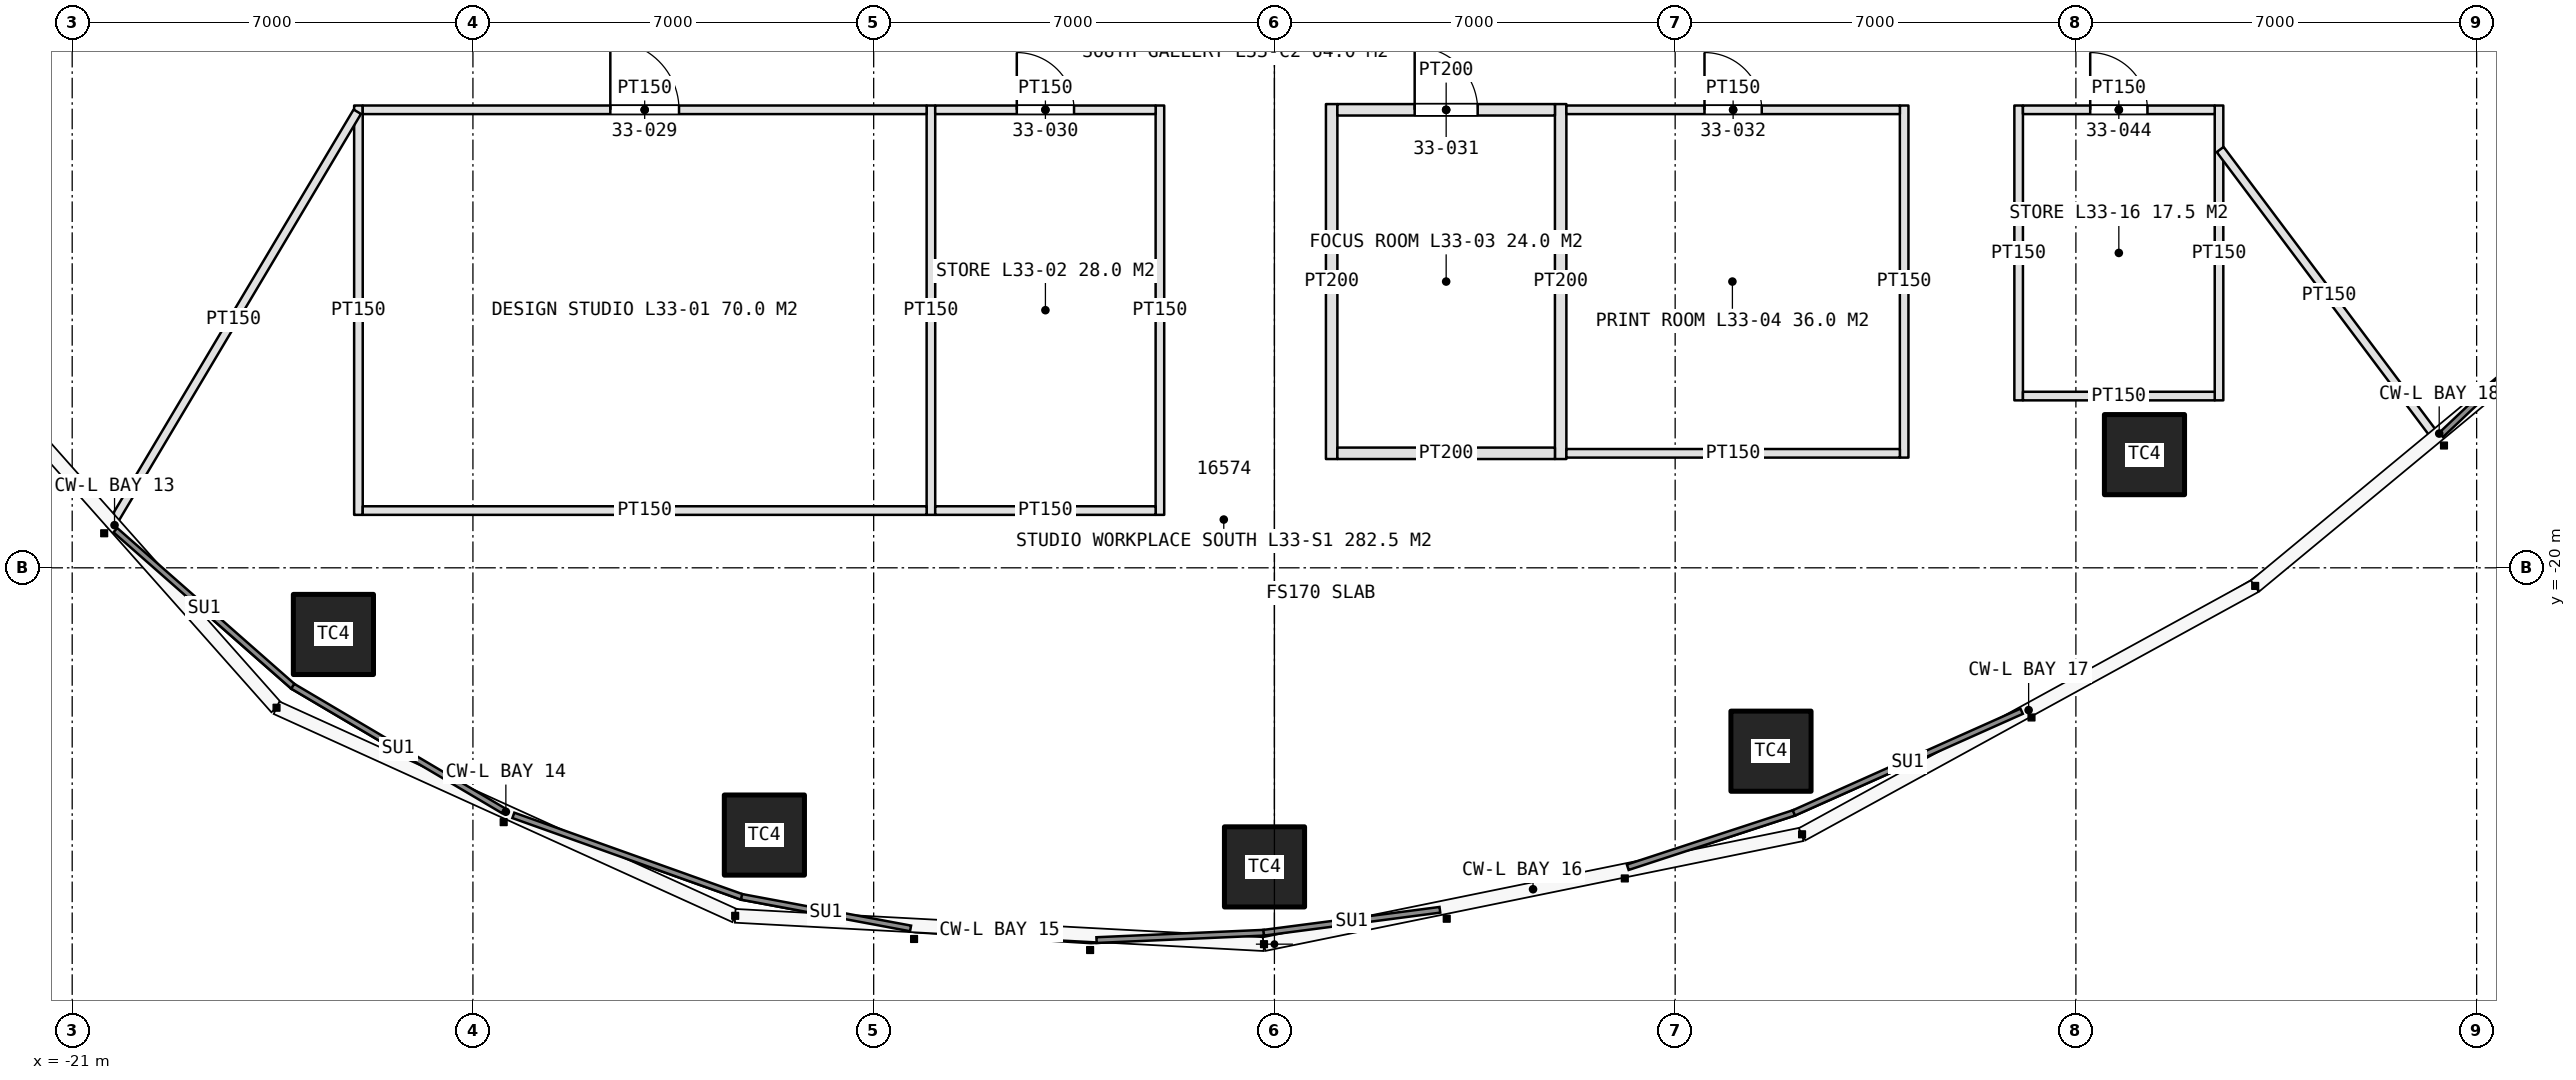
"""IFC4 building model, lengths in metres.
Left out: names, types, materials, properties, quantities, classifications, styles, units other than length and angle.
Written with IfcOpenShell. Run it as: python <this file> out.ifc"""

import sys

from ifc_helpers import new_model, si_unit, direction, frame, frame_2d, origin, origin_2d, place, context, subcontext, project, spatial, rectangle, extrude, element, fill, save


model = new_model("IFC4")
c1 = context("Model", 3, precision=1e-05, world=origin(), true_north=direction((0.0, 1.0)))
c2 = subcontext(c1, "Body", "Model", "MODEL_VIEW")
j1 = project(units=[si_unit("LENGTHUNIT", "METRE"), si_unit("PLANEANGLEUNIT", "RADIAN")], contexts=[c1])
p1 = place(None, origin())
s1 = spatial("IfcSite", under=j1, at=p1, CompositionType="ELEMENT")
p2 = place(p1, origin())
s2 = spatial("IfcBuilding", under=s1, at=p2, CompositionType="ELEMENT")
p3 = place(p2, frame((0.0, 0.0, 155.4)))
s3 = spatial("IfcBuildingStorey", under=s2, at=p3, CompositionType="ELEMENT", Elevation=155.4)
for number, where, z_axis, x_axis in (
    (1, (-16.437, -21.164, 0.0), (0.0, 0.0, 1.0), (1.0, 0.0, 0.0)),
    (2, (-8.909, -24.668, 0.0), (0.0, 0.0, 1.0), (1.0, 0.0, 0.0)),
    (3, (-0.173, -25.224, 0.0), (0.0, 0.0, 1.0), (1.0, 0.0, 0.0)),
    (4, (8.674, -23.203, 0.0), (0.0, 0.0, 1.0), (1.0, 0.0, 0.0)),
    (5, (15.198, -18.023, 0.0), (0.0, 0.0, 1.0), (1.0, 0.0, 0.0)),
):
    element("IfcColumn", number, at=place(p3, frame(where, z_axis=z_axis, x_axis=x_axis)), inside=s3, PredefinedType="COLUMN", context=c2, shape_type="SweptSolid", body=[
        extrude(rectangle(XDim=1.4, YDim=1.4, at=origin_2d()), origin(), (0.0, 0.0, 1.0), 4.2),
    ])
for number, where, z_axis, x_axis in (
    (6, (-16.0, -11.925, 0.0), (0.0, 0.0, 1.0), (0.0, -1.0, 0.0)),
    (7, (-6.0, -11.925, 0.0), (0.0, 0.0, 1.0), (0.0, -1.0, 0.0)),
    (8, (-2.0, -11.925, 0.0), (0.0, 0.0, 1.0), (0.0, -1.0, 0.0)),
):
    element("IfcWall", number, at=place(p3, frame(where, z_axis=z_axis, x_axis=x_axis)), inside=s3, PredefinedType="PARTITIONING", context=c2, shape_type="SweptSolid", body=[
        extrude(rectangle(XDim=7.15, YDim=0.15, at=frame_2d((3.575, 0.0))), origin(), (0.0, 0.0, 1.0), 3.0),
    ])
p4 = place(p3, frame((-15.925, -12.0, 0.0), z_axis=(0.0, 0.0, 1.0), x_axis=(1.0, 0.0, 0.0)))
e9 = element("IfcWall", 9, at=p4, inside=s3, PredefinedType="PARTITIONING", context=c2, shape_type="SweptSolid", body=[
    extrude(rectangle(XDim=9.85, YDim=0.15, at=frame_2d((4.925, 0.0))), origin(), (0.0, 0.0, 1.0), 3.0),
])
p5 = place(p4, frame((4.325, 0.0, 0.0)))
e10 = element("IfcOpeningElement", 10, at=p5, cuts=e9, PredefinedType="OPENING", context=c2, shape_type="SweptSolid", body=[
    extrude(rectangle(XDim=1.2, YDim=2.4, at=frame_2d((0.6, 1.2))), frame((0.0, 0.085, 0.0), z_axis=(0.0, -1.0, 0.0), x_axis=(1.0, 0.0, 0.0)), (0.0, 0.0, 1.0), 0.17),
])
p6 = place(p3, frame((-15.925, -19.0, 0.0), z_axis=(0.0, 0.0, 1.0), x_axis=(1.0, 0.0, 0.0)))
e11 = element("IfcWall", 11, at=p6, inside=s3, PredefinedType="PARTITIONING", context=c2, shape_type="SweptSolid", body=[
    extrude(rectangle(XDim=9.85, YDim=0.15, at=frame_2d((4.925, 0.0))), origin(), (0.0, 0.0, 1.0), 3.0),
])
p7 = place(p3, frame((-5.925, -12.0, 0.0), z_axis=(0.0, 0.0, 1.0), x_axis=(1.0, 0.0, 0.0)))
e12 = element("IfcWall", 12, at=p7, inside=s3, PredefinedType="PARTITIONING", context=c2, shape_type="SweptSolid", body=[
    extrude(rectangle(XDim=3.85, YDim=0.15, at=frame_2d((1.925, 0.0))), origin(), (0.0, 0.0, 1.0), 3.0),
])
p8 = place(p7, frame((1.425, 0.0, 0.0)))
e13 = element("IfcOpeningElement", 13, at=p8, cuts=e12, PredefinedType="OPENING", context=c2, shape_type="SweptSolid", body=[
    extrude(rectangle(XDim=1.0, YDim=2.2, at=frame_2d((0.5, 1.1))), frame((0.0, 0.085, 0.0), z_axis=(0.0, -1.0, 0.0), x_axis=(1.0, 0.0, 0.0)), (0.0, 0.0, 1.0), 0.17),
])
p9 = place(p3, frame((-5.925, -19.0, 0.0), z_axis=(0.0, 0.0, 1.0), x_axis=(1.0, 0.0, 0.0)))
e14 = element("IfcWall", 14, at=p9, inside=s3, PredefinedType="PARTITIONING", context=c2, shape_type="SweptSolid", body=[
    extrude(rectangle(XDim=3.85, YDim=0.15, at=frame_2d((1.925, 0.0))), origin(), (0.0, 0.0, 1.0), 3.0),
])
for number, where, z_axis, x_axis in (
    (15, (1.0, -11.9, 0.0), (0.0, 0.0, 1.0), (0.0, -1.0, 0.0)),
    (16, (5.0, -11.9, 0.0), (0.0, 0.0, 1.0), (0.0, -1.0, 0.0)),
):
    element("IfcWall", number, at=place(p3, frame(where, z_axis=z_axis, x_axis=x_axis)), inside=s3, PredefinedType="PARTITIONING", context=c2, shape_type="SweptSolid", body=[
        extrude(rectangle(XDim=6.2, YDim=0.2, at=frame_2d((3.1, 0.0))), origin(), (0.0, 0.0, 1.0), 3.0),
    ])
p10 = place(p3, frame((11.0, -11.925, 0.0), z_axis=(0.0, 0.0, 1.0), x_axis=(0.0, -1.0, 0.0)))
e17 = element("IfcWall", 17, at=p10, inside=s3, PredefinedType="PARTITIONING", context=c2, shape_type="SweptSolid", body=[
    extrude(rectangle(XDim=6.15, YDim=0.15, at=frame_2d((3.075, 0.0))), origin(), (0.0, 0.0, 1.0), 3.0),
])
p11 = place(p3, frame((1.1, -12.0, 0.0), z_axis=(0.0, 0.0, 1.0), x_axis=(1.0, 0.0, 0.0)))
e18 = element("IfcWall", 18, at=p11, inside=s3, PredefinedType="PARTITIONING", context=c2, shape_type="SweptSolid", body=[
    extrude(rectangle(XDim=3.8, YDim=0.2, at=frame_2d((1.9, 0.0))), origin(), (0.0, 0.0, 1.0), 3.0),
])
p12 = place(p11, frame((1.35, 0.0, 0.0)))
e19 = element("IfcOpeningElement", 19, at=p12, cuts=e18, PredefinedType="OPENING", context=c2, shape_type="SweptSolid", body=[
    extrude(rectangle(XDim=1.1, YDim=2.3, at=frame_2d((0.55, 1.15))), frame((0.0, 0.11, 0.0), z_axis=(0.0, -1.0, 0.0), x_axis=(1.0, 0.0, 0.0)), (0.0, 0.0, 1.0), 0.22),
])
p13 = place(p3, frame((1.1, -18.0, 0.0), z_axis=(0.0, 0.0, 1.0), x_axis=(1.0, 0.0, 0.0)))
e20 = element("IfcWall", 20, at=p13, inside=s3, PredefinedType="PARTITIONING", context=c2, shape_type="SweptSolid", body=[
    extrude(rectangle(XDim=3.8, YDim=0.2, at=frame_2d((1.9, 0.0))), origin(), (0.0, 0.0, 1.0), 3.0),
])
p14 = place(p3, frame((5.1, -12.0, 0.0), z_axis=(0.0, 0.0, 1.0), x_axis=(1.0, 0.0, 0.0)))
e21 = element("IfcWall", 21, at=p14, inside=s3, PredefinedType="PARTITIONING", context=c2, shape_type="SweptSolid", body=[
    extrude(rectangle(XDim=5.825, YDim=0.15, at=frame_2d((2.913, 0.0))), origin(), (0.0, 0.0, 1.0), 3.0),
])
p15 = place(p14, frame((2.413, 0.0, 0.0)))
e22 = element("IfcOpeningElement", 22, at=p15, cuts=e21, PredefinedType="OPENING", context=c2, shape_type="SweptSolid", body=[
    extrude(rectangle(XDim=1.0, YDim=2.2, at=frame_2d((0.5, 1.1))), frame((0.0, 0.085, 0.0), z_axis=(0.0, -1.0, 0.0), x_axis=(1.0, 0.0, 0.0)), (0.0, 0.0, 1.0), 0.17),
])
p16 = place(p3, frame((5.1, -18.0, 0.0), z_axis=(0.0, 0.0, 1.0), x_axis=(1.0, 0.0, 0.0)))
e23 = element("IfcWall", 23, at=p16, inside=s3, PredefinedType="PARTITIONING", context=c2, shape_type="SweptSolid", body=[
    extrude(rectangle(XDim=5.825, YDim=0.15, at=frame_2d((2.913, 0.0))), origin(), (0.0, 0.0, 1.0), 3.0),
])
for number, where, z_axis, x_axis in (
    (24, (13.0, -11.925, 0.0), (0.0, 0.0, 1.0), (0.0, -1.0, 0.0)),
    (25, (16.5, -11.925, 0.0), (0.0, 0.0, 1.0), (0.0, -1.0, 0.0)),
):
    element("IfcWall", number, at=place(p3, frame(where, z_axis=z_axis, x_axis=x_axis)), inside=s3, PredefinedType="PARTITIONING", context=c2, shape_type="SweptSolid", body=[
        extrude(rectangle(XDim=5.15, YDim=0.15, at=frame_2d((2.575, 0.0))), origin(), (0.0, 0.0, 1.0), 3.0),
    ])
p17 = place(p3, frame((13.075, -12.0, 0.0), z_axis=(0.0, 0.0, 1.0), x_axis=(1.0, 0.0, 0.0)))
e26 = element("IfcWall", 26, at=p17, inside=s3, PredefinedType="PARTITIONING", context=c2, shape_type="SweptSolid", body=[
    extrude(rectangle(XDim=3.35, YDim=0.15, at=frame_2d((1.675, 0.0))), origin(), (0.0, 0.0, 1.0), 3.0),
])
p18 = place(p17, frame((1.175, 0.0, 0.0)))
e27 = element("IfcOpeningElement", 27, at=p18, cuts=e26, PredefinedType="OPENING", context=c2, shape_type="SweptSolid", body=[
    extrude(rectangle(XDim=1.0, YDim=2.2, at=frame_2d((0.5, 1.1))), frame((0.0, 0.085, 0.0), z_axis=(0.0, -1.0, 0.0), x_axis=(1.0, 0.0, 0.0)), (0.0, 0.0, 1.0), 0.17),
])
p19 = place(p3, frame((13.075, -17.0, 0.0), z_axis=(0.0, 0.0, 1.0), x_axis=(1.0, 0.0, 0.0)))
e28 = element("IfcWall", 28, at=p19, inside=s3, PredefinedType="PARTITIONING", context=c2, shape_type="SweptSolid", body=[
    extrude(rectangle(XDim=3.35, YDim=0.15, at=frame_2d((1.675, 0.0))), origin(), (0.0, 0.0, 1.0), 3.0),
])
p20 = place(p3, frame((-16.02, -12.034, 0.0), z_axis=(0.0, 0.0, 1.0), x_axis=(-0.511518902153, -0.859272024879, 0.0)))
e29 = element("IfcWall", 29, at=p20, inside=s3, PredefinedType="PARTITIONING", context=c2, shape_type="SweptSolid", body=[
    extrude(rectangle(XDim=8.451, YDim=0.15, at=frame_2d((4.226, 0.0))), origin(), (0.0, 0.0, 1.0), 3.0),
])
p21 = place(p3, frame((16.52, -12.693, 0.0), z_axis=(0.0, 0.0, 1.0), x_axis=(0.600036938918, -0.799972294479, 0.0)))
e30 = element("IfcWall", 30, at=p21, inside=s3, PredefinedType="PARTITIONING", context=c2, shape_type="SweptSolid", body=[
    extrude(rectangle(XDim=6.345, YDim=0.15, at=frame_2d((3.172, 0.0))), origin(), (0.0, 0.0, 1.0), 3.0),
])
p22 = place(p5, origin())
e31 = element("IfcDoor", 31, at=p22, inside=s3, OperationType="SINGLE_SWING_LEFT", PredefinedType="DOOR", context=c2, shape_type="SweptSolid", body=[
    extrude(rectangle(XDim=1.2, YDim=2.4, at=frame_2d((0.6, 1.2))), frame((0.0, 0.025, 0.0), z_axis=(0.0, -1.0, 0.0), x_axis=(1.0, 0.0, 0.0)), (0.0, 0.0, 1.0), 0.05),
])
fill(e10, e31)
p23 = place(p8, origin())
e32 = element("IfcDoor", 32, at=p23, inside=s3, OperationType="SINGLE_SWING_LEFT", PredefinedType="DOOR", context=c2, shape_type="SweptSolid", body=[
    extrude(rectangle(XDim=1.0, YDim=2.2, at=frame_2d((0.5, 1.1))), frame((0.0, 0.025, 0.0), z_axis=(0.0, -1.0, 0.0), x_axis=(1.0, 0.0, 0.0)), (0.0, 0.0, 1.0), 0.05),
])
fill(e13, e32)
p24 = place(p12, origin())
e33 = element("IfcDoor", 33, at=p24, inside=s3, OperationType="SINGLE_SWING_LEFT", PredefinedType="DOOR", context=c2, shape_type="SweptSolid", body=[
    extrude(rectangle(XDim=1.1, YDim=2.3, at=frame_2d((0.55, 1.15))), frame((0.0, 0.025, 0.0), z_axis=(0.0, -1.0, 0.0), x_axis=(1.0, 0.0, 0.0)), (0.0, 0.0, 1.0), 0.05),
])
fill(e19, e33)
p25 = place(p15, origin())
e34 = element("IfcDoor", 34, at=p25, inside=s3, OperationType="SINGLE_SWING_LEFT", PredefinedType="DOOR", context=c2, shape_type="SweptSolid", body=[
    extrude(rectangle(XDim=1.0, YDim=2.2, at=frame_2d((0.5, 1.1))), frame((0.0, 0.025, 0.0), z_axis=(0.0, -1.0, 0.0), x_axis=(1.0, 0.0, 0.0)), (0.0, 0.0, 1.0), 0.05),
])
fill(e22, e34)
p26 = place(p18, origin())
e35 = element("IfcDoor", 35, at=p26, inside=s3, OperationType="SINGLE_SWING_LEFT", PredefinedType="DOOR", context=c2, shape_type="SweptSolid", body=[
    extrude(rectangle(XDim=1.0, YDim=2.2, at=frame_2d((0.5, 1.1))), frame((0.0, 0.025, 0.0), z_axis=(0.0, -1.0, 0.0), x_axis=(1.0, 0.0, 0.0)), (0.0, 0.0, 1.0), 0.05),
])
fill(e27, e35)
save(model, sys.argv[1])
